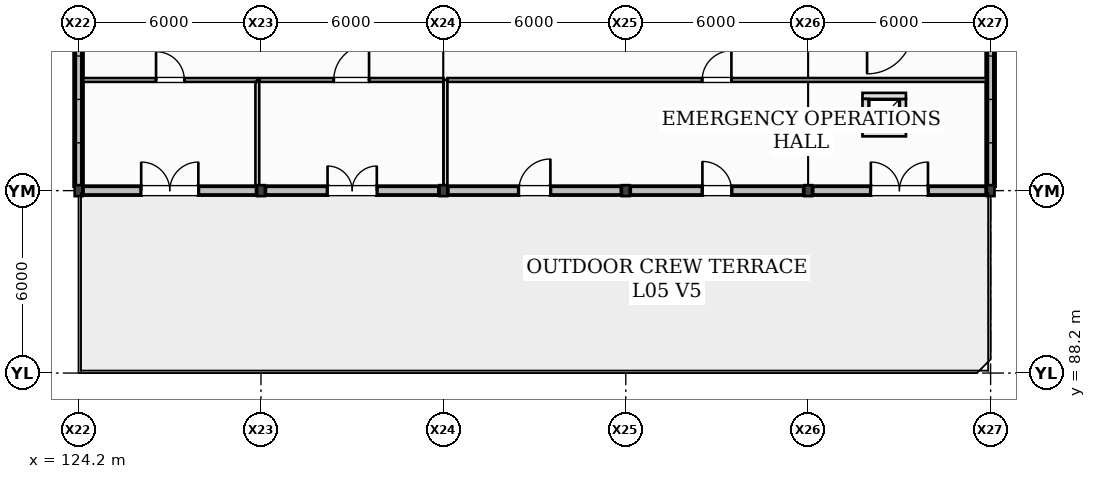
"""IFC4 building model, lengths in metres.
Left out: names, types, materials, properties, quantities, classifications, styles, units other than length and angle.
Written with IfcOpenShell. Run it as: python <this file> out.ifc"""

import sys

from ifc_helpers import new_model, si_unit, direction, frame, frame_2d, origin, origin_2d, place, context, subcontext, project, spatial, rectangle, i_section, extrude, element, fill, save


model = new_model("IFC4")
c1 = context("Model", 3, precision=1e-05, world=origin(), true_north=direction((0.0, 1.0)))
c2 = subcontext(c1, "Body", "Model", "MODEL_VIEW")
j1 = project(units=[si_unit("LENGTHUNIT", "METRE"), si_unit("PLANEANGLEUNIT", "RADIAN")], contexts=[c1])
p1 = place(None, origin())
s1 = spatial("IfcSite", under=j1, at=p1, CompositionType="ELEMENT")
p2 = place(p1, origin())
s2 = spatial("IfcBuilding", under=s1, at=p2, CompositionType="ELEMENT")
p3 = place(p2, frame((0.0, 0.0, 18.0)))
s3 = spatial("IfcBuildingStorey", under=s2, at=p3, CompositionType="ELEMENT", Elevation=18.0)
for number, where, z_axis, x_axis in (
    (1, (124.2, 94.2, 0.0), (0.0, 0.0, 1.0), (1.0, 0.0, 0.0)),
    (2, (130.2, 94.2, 0.0), (0.0, 0.0, 1.0), (1.0, 0.0, 0.0)),
    (3, (136.2, 94.2, 0.0), (0.0, 0.0, 1.0), (1.0, 0.0, 0.0)),
    (4, (142.2, 94.2, 0.0), (0.0, 0.0, 1.0), (1.0, 0.0, 0.0)),
    (5, (148.2, 94.2, 0.0), (0.0, 0.0, 1.0), (1.0, 0.0, 0.0)),
    (6, (154.2, 94.2, 0.0), (0.0, 0.0, 1.0), (1.0, 0.0, 0.0)),
):
    element("IfcColumn", number, at=place(p3, frame(where, z_axis=z_axis, x_axis=x_axis)), inside=s3, PredefinedType="COLUMN", context=c2, shape_type="SweptSolid", body=[
        extrude(i_section(OverallWidth=0.256, OverallDepth=0.36, WebThickness=0.011, FlangeThickness=0.02, at=origin_2d()), origin(), (0.0, 0.0, 1.0), 3.6),
    ])
p4 = place(p3, frame((124.345, 94.2, 0.0), z_axis=(0.0, 0.0, 1.0), x_axis=(1.0, 0.0, 0.0)))
e7 = element("IfcWall", 7, at=p4, inside=s3, PredefinedType="STANDARD", context=c2, shape_type="SweptSolid", body=[
    extrude(rectangle(XDim=5.71, YDim=0.29, at=frame_2d((2.855, 0.0))), origin(), (0.0, 0.0, 1.0), 3.6),
])
p5 = place(p4, frame((1.915, 0.0, 0.0)))
e8 = element("IfcOpeningElement", 8, at=p5, cuts=e7, PredefinedType="OPENING", context=c2, shape_type="SweptSolid", body=[
    extrude(rectangle(XDim=1.88, YDim=2.28, at=frame_2d((0.94, 1.14))), frame((0.0, 0.155, 0.0), z_axis=(0.0, -1.0, 0.0), x_axis=(1.0, 0.0, 0.0)), (0.0, 0.0, 1.0), 0.31),
])
p6 = place(p3, frame((130.345, 94.2, 0.0), z_axis=(0.0, 0.0, 1.0), x_axis=(1.0, 0.0, 0.0)))
e9 = element("IfcWall", 9, at=p6, inside=s3, PredefinedType="STANDARD", context=c2, shape_type="SweptSolid", body=[
    extrude(rectangle(XDim=5.71, YDim=0.29, at=frame_2d((2.855, 0.0))), origin(), (0.0, 0.0, 1.0), 3.6),
])
p7 = place(p6, frame((2.045, 0.0, 0.0)))
e10 = element("IfcOpeningElement", 10, at=p7, cuts=e9, PredefinedType="OPENING", context=c2, shape_type="SweptSolid", body=[
    extrude(rectangle(XDim=1.62, YDim=2.2, at=frame_2d((0.81, 1.1))), frame((0.0, 0.155, 0.0), z_axis=(0.0, -1.0, 0.0), x_axis=(1.0, 0.0, 0.0)), (0.0, 0.0, 1.0), 0.31),
])
p8 = place(p3, frame((136.345, 94.2, 0.0), z_axis=(0.0, 0.0, 1.0), x_axis=(1.0, 0.0, 0.0)))
e11 = element("IfcWall", 11, at=p8, inside=s3, PredefinedType="STANDARD", context=c2, shape_type="SweptSolid", body=[
    extrude(rectangle(XDim=5.71, YDim=0.29, at=frame_2d((2.855, 0.0))), origin(), (0.0, 0.0, 1.0), 3.6),
])
p9 = place(p8, frame((2.335, 0.0, 0.0)))
e12 = element("IfcOpeningElement", 12, at=p9, cuts=e11, PredefinedType="OPENING", context=c2, shape_type="SweptSolid", body=[
    extrude(rectangle(XDim=1.04, YDim=2.16, at=frame_2d((0.52, 1.08))), frame((0.0, 0.155, 0.0), z_axis=(0.0, -1.0, 0.0), x_axis=(1.0, 0.0, 0.0)), (0.0, 0.0, 1.0), 0.31),
])
p10 = place(p3, frame((142.345, 94.2, 0.0), z_axis=(0.0, 0.0, 1.0), x_axis=(1.0, 0.0, 0.0)))
e13 = element("IfcWall", 13, at=p10, inside=s3, PredefinedType="STANDARD", context=c2, shape_type="SweptSolid", body=[
    extrude(rectangle(XDim=5.71, YDim=0.29, at=frame_2d((2.855, 0.0))), origin(), (0.0, 0.0, 1.0), 3.219),
])
p11 = place(p10, frame((2.375, 0.0, 0.0)))
e14 = element("IfcOpeningElement", 14, at=p11, cuts=e13, PredefinedType="OPENING", context=c2, shape_type="SweptSolid", body=[
    extrude(rectangle(XDim=0.96, YDim=2.14, at=frame_2d((0.48, 1.07))), frame((0.0, 0.155, 0.0), z_axis=(0.0, -1.0, 0.0), x_axis=(1.0, 0.0, 0.0)), (0.0, 0.0, 1.0), 0.31),
])
p12 = place(p3, frame((148.345, 94.2, 0.0), z_axis=(0.0, 0.0, 1.0), x_axis=(1.0, 0.0, 0.0)))
e15 = element("IfcWall", 15, at=p12, inside=s3, PredefinedType="STANDARD", context=c2, shape_type="SweptSolid", body=[
    extrude(rectangle(XDim=5.71, YDim=0.29, at=frame_2d((2.855, 0.0))), origin(), (0.0, 0.0, 1.0), 3.219),
])
p13 = place(p12, frame((1.915, 0.0, 0.0)))
e16 = element("IfcOpeningElement", 16, at=p13, cuts=e15, PredefinedType="OPENING", context=c2, shape_type="SweptSolid", body=[
    extrude(rectangle(XDim=1.88, YDim=2.28, at=frame_2d((0.94, 1.14))), frame((0.0, 0.155, 0.0), z_axis=(0.0, -1.0, 0.0), x_axis=(1.0, 0.0, 0.0)), (0.0, 0.0, 1.0), 0.31),
])
p14 = place(p3, frame((124.2, 100.055, 0.0), z_axis=(0.0, 0.0, 1.0), x_axis=(0.0, -1.0, 0.0)))
e17 = element("IfcWall", 17, at=p14, inside=s3, PredefinedType="STANDARD", context=c2, shape_type="SweptSolid", body=[
    extrude(rectangle(XDim=5.71, YDim=0.29, at=frame_2d((2.855, 0.0))), origin(), (0.0, 0.0, 1.0), 0.92),
])
p15 = place(p3, frame((154.2, 94.345, 0.0), z_axis=(0.0, 0.0, 1.0), x_axis=(0.0, 1.0, 0.0)))
e18 = element("IfcWall", 18, at=p15, inside=s3, PredefinedType="STANDARD", context=c2, shape_type="SweptSolid", body=[
    extrude(rectangle(XDim=5.71, YDim=0.29, at=frame_2d((2.855, 0.0))), origin(), (0.0, 0.0, 1.0), 0.44),
])
p16 = place(p3, frame((149.985, 96.085, 0.0), z_axis=(0.0, 0.0, 1.0), x_axis=(1.0, 0.0, 0.0)))
e19 = element("IfcWall", 19, at=p16, inside=s3, PredefinedType="PARTITIONING", context=c2, shape_type="SweptSolid", body=[
    extrude(rectangle(XDim=1.43, YDim=0.2, at=frame_2d((0.715, 0.0))), origin(), (0.0, 0.0, 1.0), 3.36),
])
p17 = place(p3, frame((151.315, 96.185, 0.0), z_axis=(0.0, 0.0, 1.0), x_axis=(0.0, 1.0, 0.0)))
e20 = element("IfcWall", 20, at=p17, inside=s3, PredefinedType="PARTITIONING", context=c2, shape_type="SweptSolid", body=[
    extrude(rectangle(XDim=1.03, YDim=0.2, at=frame_2d((0.515, 0.0))), origin(), (0.0, 0.0, 1.0), 3.36),
])
p18 = place(p3, frame((151.415, 97.315, 0.0), z_axis=(0.0, 0.0, 1.0), x_axis=(-1.0, 0.0, 0.0)))
e21 = element("IfcWall", 21, at=p18, inside=s3, PredefinedType="PARTITIONING", context=c2, shape_type="SweptSolid", body=[
    extrude(rectangle(XDim=1.43, YDim=0.2, at=frame_2d((0.715, 0.0))), origin(), (0.0, 0.0, 1.0), 3.36),
])
p19 = place(p3, frame((150.085, 97.215, 0.0), z_axis=(0.0, 0.0, 1.0), x_axis=(0.0, -1.0, 0.0)))
e22 = element("IfcWall", 22, at=p19, inside=s3, PredefinedType="PARTITIONING", context=c2, shape_type="SweptSolid", body=[
    extrude(rectangle(XDim=1.03, YDim=0.2, at=frame_2d((0.515, 0.0))), origin(), (0.0, 0.0, 1.0), 3.36),
])
p20 = place(p3, frame((136.27, 94.345, 0.0), z_axis=(0.0, 0.0, 1.0), x_axis=(0.0, 1.0, 0.0)))
e23 = element("IfcWall", 23, at=p20, inside=s3, PredefinedType="PARTITIONING", context=c2, shape_type="SweptSolid", body=[
    extrude(rectangle(XDim=3.498, YDim=0.125, at=frame_2d((1.749, 0.0))), origin(), (0.0, 0.0, 1.0), 3.36),
])
p21 = place(p3, frame((136.333, 97.84, 0.0), z_axis=(0.0, 0.0, 1.0), x_axis=(1.0, 0.0, 0.0)))
e24 = element("IfcWall", 24, at=p21, inside=s3, PredefinedType="PARTITIONING", context=c2, shape_type="SweptSolid", body=[
    extrude(rectangle(XDim=17.722, YDim=0.125, at=frame_2d((8.861, 0.0))), origin(), (0.0, 0.0, 1.0), 3.36),
])
p22 = place(p21, frame((8.381, 0.0, 0.0)))
e25 = element("IfcOpeningElement", 25, at=p22, cuts=e24, PredefinedType="OPENING", context=c2, shape_type="SweptSolid", body=[
    extrude(rectangle(XDim=0.96, YDim=2.15, at=frame_2d((0.48, 1.075))), frame((0.0, 0.073, 0.0), z_axis=(0.0, -1.0, 0.0), x_axis=(1.0, 0.0, 0.0)), (0.0, 0.0, 1.0), 0.145),
])
p23 = place(p3, frame((124.345, 97.84, 0.0), z_axis=(0.0, 0.0, 1.0), x_axis=(1.0, 0.0, 0.0)))
e26 = element("IfcWall", 26, at=p23, inside=s3, PredefinedType="PARTITIONING", context=c2, shape_type="SweptSolid", body=[
    extrude(rectangle(XDim=5.738, YDim=0.125, at=frame_2d((2.869, 0.0))), origin(), (0.0, 0.0, 1.0), 3.36),
])
p24 = place(p23, frame((2.404, 0.0, 0.0)))
e27 = element("IfcOpeningElement", 27, at=p24, cuts=e26, PredefinedType="OPENING", context=c2, shape_type="SweptSolid", body=[
    extrude(rectangle(XDim=0.93, YDim=2.1, at=frame_2d((0.465, 1.05))), frame((0.0, 0.073, 0.0), z_axis=(0.0, -1.0, 0.0), x_axis=(1.0, 0.0, 0.0)), (0.0, 0.0, 1.0), 0.145),
])
p25 = place(p3, frame((130.08, 97.778, 0.0), z_axis=(0.0, 0.0, 1.0), x_axis=(0.0, -1.0, 0.0)))
e28 = element("IfcWall", 28, at=p25, inside=s3, PredefinedType="PARTITIONING", context=c2, shape_type="SweptSolid", body=[
    extrude(rectangle(XDim=3.433, YDim=0.125, at=frame_2d((1.716, 0.0))), origin(), (0.0, 0.0, 1.0), 3.36),
])
p26 = place(p3, frame((130.143, 97.84, 0.0), z_axis=(0.0, 0.0, 1.0), x_axis=(1.0, 0.0, 0.0)))
e29 = element("IfcWall", 29, at=p26, inside=s3, PredefinedType="PARTITIONING", context=c2, shape_type="SweptSolid", body=[
    extrude(rectangle(XDim=6.065, YDim=0.125, at=frame_2d((3.032, 0.0))), origin(), (0.0, 0.0, 1.0), 3.36),
])
p27 = place(p26, frame((2.452, 0.0, 0.0)))
e30 = element("IfcOpeningElement", 30, at=p27, cuts=e29, PredefinedType="OPENING", context=c2, shape_type="SweptSolid", body=[
    extrude(rectangle(XDim=1.16, YDim=2.2, at=frame_2d((0.58, 1.1))), frame((0.0, 0.073, 0.0), z_axis=(0.0, -1.0, 0.0), x_axis=(1.0, 0.0, 0.0)), (0.0, 0.0, 1.0), 0.145),
])
p28 = place(p5, frame((1.88, 0.0, 0.0), z_axis=(0.0, 0.0, 1.0), x_axis=(-1.0, 0.0, 0.0)))
e31 = element("IfcDoor", 31, at=p28, inside=s3, OperationType="DOUBLE_DOOR_SINGLE_SWING", PredefinedType="DOOR", context=c2, shape_type="SweptSolid", body=[
    extrude(rectangle(XDim=1.88, YDim=2.28, at=frame_2d((0.94, 1.14))), frame((0.0, 0.025, 0.0), z_axis=(0.0, -1.0, 0.0), x_axis=(1.0, 0.0, 0.0)), (0.0, 0.0, 1.0), 0.05),
])
fill(e8, e31)
p29 = place(p7, frame((1.62, 0.0, 0.0), z_axis=(0.0, 0.0, 1.0), x_axis=(-1.0, 0.0, 0.0)))
e32 = element("IfcDoor", 32, at=p29, inside=s3, OperationType="DOUBLE_DOOR_SINGLE_SWING", PredefinedType="DOOR", context=c2, shape_type="SweptSolid", body=[
    extrude(rectangle(XDim=1.62, YDim=2.2, at=frame_2d((0.81, 1.1))), frame((0.0, 0.025, 0.0), z_axis=(0.0, -1.0, 0.0), x_axis=(1.0, 0.0, 0.0)), (0.0, 0.0, 1.0), 0.05),
])
fill(e10, e32)
p30 = place(p9, frame((1.04, 0.0, 0.0), z_axis=(0.0, 0.0, 1.0), x_axis=(-1.0, 0.0, 0.0)))
e33 = element("IfcDoor", 33, at=p30, inside=s3, OperationType="SINGLE_SWING_RIGHT", PredefinedType="DOOR", context=c2, shape_type="SweptSolid", body=[
    extrude(rectangle(XDim=1.04, YDim=2.16, at=frame_2d((0.52, 1.08))), frame((0.0, 0.025, 0.0), z_axis=(0.0, -1.0, 0.0), x_axis=(1.0, 0.0, 0.0)), (0.0, 0.0, 1.0), 0.05),
])
fill(e12, e33)
p31 = place(p11, frame((0.96, 0.0, 0.0), z_axis=(0.0, 0.0, 1.0), x_axis=(-1.0, 0.0, 0.0)))
e34 = element("IfcDoor", 34, at=p31, inside=s3, OperationType="SINGLE_SWING_LEFT", PredefinedType="DOOR", context=c2, shape_type="SweptSolid", body=[
    extrude(rectangle(XDim=0.96, YDim=2.14, at=frame_2d((0.48, 1.07))), frame((0.0, 0.025, 0.0), z_axis=(0.0, -1.0, 0.0), x_axis=(1.0, 0.0, 0.0)), (0.0, 0.0, 1.0), 0.05),
])
fill(e14, e34)
p32 = place(p13, frame((1.88, 0.0, 0.0), z_axis=(0.0, 0.0, 1.0), x_axis=(-1.0, 0.0, 0.0)))
e35 = element("IfcDoor", 35, at=p32, inside=s3, OperationType="DOUBLE_DOOR_SINGLE_SWING", PredefinedType="DOOR", context=c2, shape_type="SweptSolid", body=[
    extrude(rectangle(XDim=1.88, YDim=2.28, at=frame_2d((0.94, 1.14))), frame((0.0, 0.025, 0.0), z_axis=(0.0, -1.0, 0.0), x_axis=(1.0, 0.0, 0.0)), (0.0, 0.0, 1.0), 0.05),
])
fill(e16, e35)
p33 = place(p22, origin())
e36 = element("IfcDoor", 36, at=p33, inside=s3, OperationType="SINGLE_SWING_RIGHT", PredefinedType="DOOR", context=c2, shape_type="SweptSolid", body=[
    extrude(rectangle(XDim=0.96, YDim=2.15, at=frame_2d((0.48, 1.075))), frame((0.0, 0.025, 0.0), z_axis=(0.0, -1.0, 0.0), x_axis=(1.0, 0.0, 0.0)), (0.0, 0.0, 1.0), 0.05),
])
fill(e25, e36)
p34 = place(p24, frame((0.93, 0.0, 0.0), z_axis=(0.0, 0.0, 1.0), x_axis=(-1.0, 0.0, 0.0)))
e37 = element("IfcDoor", 37, at=p34, inside=s3, OperationType="SINGLE_SWING_LEFT", PredefinedType="DOOR", context=c2, shape_type="SweptSolid", body=[
    extrude(rectangle(XDim=0.93, YDim=2.1, at=frame_2d((0.465, 1.05))), frame((0.0, 0.025, 0.0), z_axis=(0.0, -1.0, 0.0), x_axis=(1.0, 0.0, 0.0)), (0.0, 0.0, 1.0), 0.05),
])
fill(e27, e37)
p35 = place(p27, frame((1.16, 0.0, 0.0), z_axis=(0.0, 0.0, 1.0), x_axis=(-1.0, 0.0, 0.0)))
e38 = element("IfcDoor", 38, at=p35, inside=s3, OperationType="SINGLE_SWING_RIGHT", PredefinedType="DOOR", context=c2, shape_type="SweptSolid", body=[
    extrude(rectangle(XDim=1.16, YDim=2.2, at=frame_2d((0.58, 1.1))), frame((0.0, 0.025, 0.0), z_axis=(0.0, -1.0, 0.0), x_axis=(1.0, 0.0, 0.0)), (0.0, 0.0, 1.0), 0.05),
])
fill(e30, e38)
save(model, sys.argv[1])
